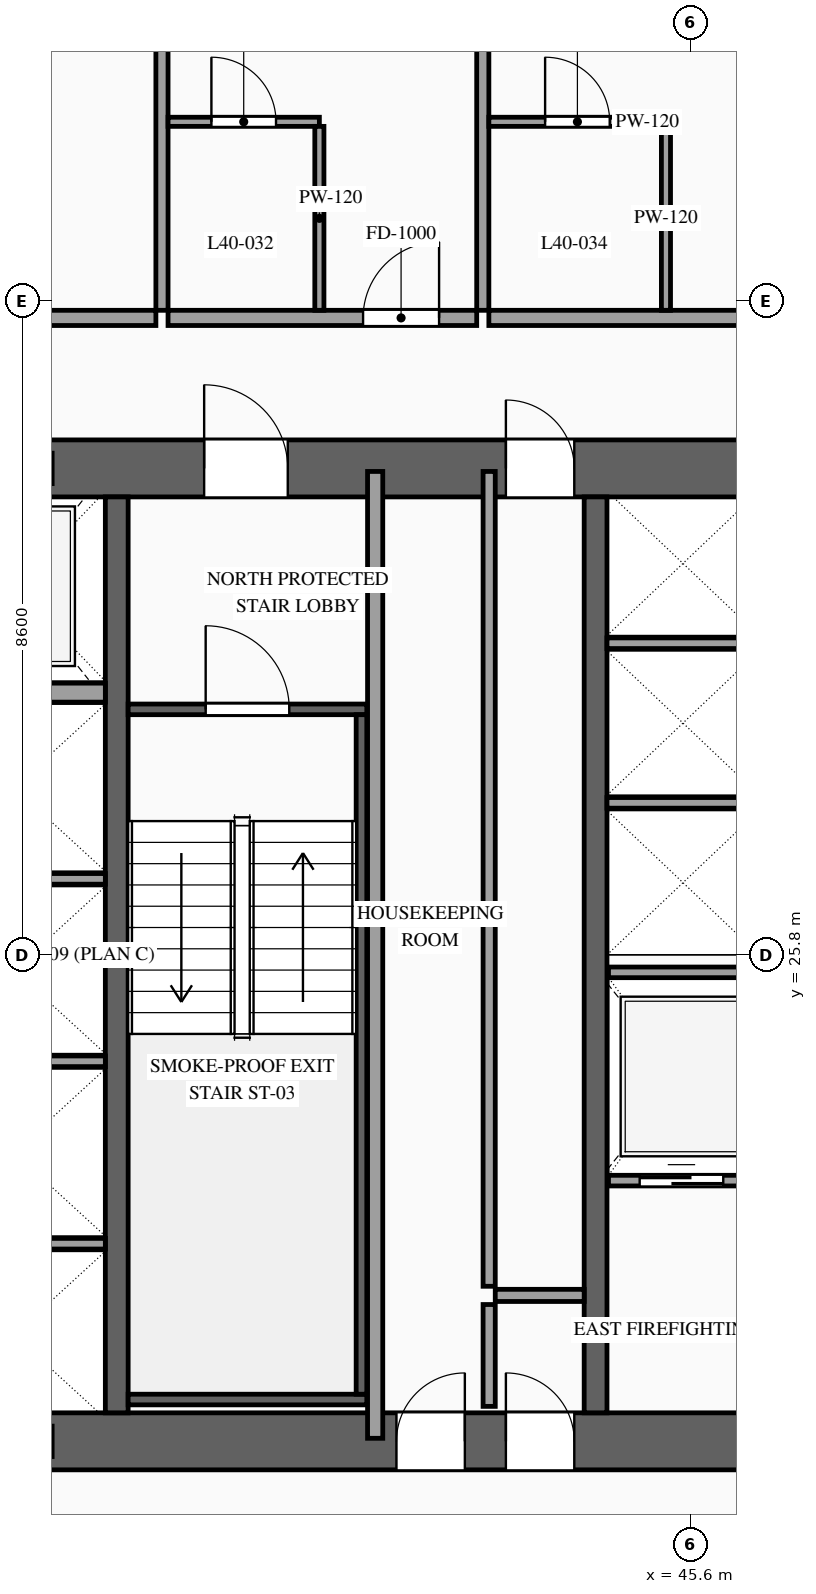
"""IFC4 building model, lengths in metres.
Left out: names, types, materials, properties, quantities, classifications, styles, units other than length and angle.
Written with IfcOpenShell. Run it as: python <this file> out.ifc"""

import sys

from ifc_helpers import new_model, si_unit, direction, frame, frame_2d, origin, place, context, subcontext, project, spatial, rectangle, extrude, source, transform, mapped, element, fill, save


model = new_model("IFC4")
c1 = context("Model", 3, precision=1e-05, world=origin(), true_north=direction((0.0, 1.0)))
c2 = subcontext(c1, "Body", "Model", "MODEL_VIEW")
j1 = project(units=[si_unit("LENGTHUNIT", "METRE"), si_unit("PLANEANGLEUNIT", "RADIAN")], contexts=[c1])
p1 = place(None, origin())
s1 = spatial("IfcSite", under=j1, at=p1, CompositionType="ELEMENT")
p2 = place(p1, origin())
s2 = spatial("IfcBuilding", under=s1, at=p2, CompositionType="ELEMENT")
p3 = place(p2, frame((0.0, 0.0, 152.4)))
s3 = spatial("IfcBuildingStorey", under=s2, at=p3, CompositionType="ELEMENT", Elevation=152.4)
p4 = place(p3, frame((23.425, 19.4, 0.0), z_axis=(0.0, 0.0, 1.0), x_axis=(1.0, 0.0, 0.0)))
e1 = element("IfcWall", 1, at=p4, inside=s3, PredefinedType="SHEAR", context=c2, shape_type="SweptSolid", body=[
    extrude(rectangle(XDim=27.15, YDim=0.75, at=frame_2d((13.575, 0.0))), origin(), (0.0, 0.0, 1.0), 3.6),
])
p5 = place(p4, frame((2.025, 0.0, 0.0)))
e2 = element("IfcOpeningElement", 2, at=p5, cuts=e1, PredefinedType="OPENING", context=c2, shape_type="SweptSolid", body=[
    extrude(rectangle(XDim=1.1, YDim=2.2, at=frame_2d((0.55, 1.1))), frame((0.0, 0.39, 0.0), z_axis=(0.0, -1.0, 0.0), x_axis=(1.0, 0.0, 0.0)), (0.0, 0.0, 1.0), 0.78),
])
p6 = place(p4, frame((9.925, 0.0, 0.0)))
e3 = element("IfcOpeningElement", 3, at=p6, cuts=e1, PredefinedType="OPENING", context=c2, shape_type="SweptSolid", body=[
    extrude(rectangle(XDim=1.1, YDim=2.2, at=frame_2d((0.55, 1.1))), frame((0.0, 0.39, 0.0), z_axis=(0.0, -1.0, 0.0), x_axis=(1.0, 0.0, 0.0)), (0.0, 0.0, 1.0), 0.78),
])
p7 = place(p4, frame((23.125, 0.0, 0.0)))
e4 = element("IfcOpeningElement", 4, at=p7, cuts=e1, PredefinedType="OPENING", context=c2, shape_type="SweptSolid", body=[
    extrude(rectangle(XDim=1.1, YDim=2.2, at=frame_2d((0.55, 1.1))), frame((0.0, 0.39, 0.0), z_axis=(0.0, -1.0, 0.0), x_axis=(1.0, 0.0, 0.0)), (0.0, 0.0, 1.0), 0.78),
])
p8 = place(p4, frame((19.745, 0.0, 0.0)))
e5 = element("IfcOpeningElement", 5, at=p8, cuts=e1, PredefinedType="OPENING", context=c2, shape_type="SweptSolid", body=[
    extrude(rectangle(XDim=0.9, YDim=2.15, at=frame_2d((0.45, 1.075))), frame((0.0, 0.39, 0.0), z_axis=(0.0, -1.0, 0.0), x_axis=(1.0, 0.0, 0.0)), (0.0, 0.0, 1.0), 0.78),
])
p9 = place(p4, frame((18.305, 0.0, 0.0)))
e6 = element("IfcOpeningElement", 6, at=p9, cuts=e1, PredefinedType="OPENING", context=c2, shape_type="SweptSolid", body=[
    extrude(rectangle(XDim=0.9, YDim=2.15, at=frame_2d((0.45, 1.075))), frame((0.0, 0.39, 0.0), z_axis=(0.0, -1.0, 0.0), x_axis=(1.0, 0.0, 0.0)), (0.0, 0.0, 1.0), 0.78),
])
p10 = place(p3, frame((23.425, 32.2, 0.0), z_axis=(0.0, 0.0, 1.0), x_axis=(1.0, 0.0, 0.0)))
e7 = element("IfcWall", 7, at=p10, inside=s3, PredefinedType="SHEAR", context=c2, shape_type="SweptSolid", body=[
    extrude(rectangle(XDim=27.15, YDim=0.75, at=frame_2d((13.575, 0.0))), origin(), (0.0, 0.0, 1.0), 3.6),
])
p11 = place(p10, frame((4.645, 0.0, 0.0)))
e8 = element("IfcOpeningElement", 8, at=p11, cuts=e7, PredefinedType="OPENING", context=c2, shape_type="SweptSolid", body=[
    extrude(rectangle(XDim=0.9, YDim=2.15, at=frame_2d((0.45, 1.075))), frame((0.0, 0.39, 0.0), z_axis=(0.0, -1.0, 0.0), x_axis=(1.0, 0.0, 0.0)), (0.0, 0.0, 1.0), 0.78),
])
p12 = place(p10, frame((9.925, 0.0, 0.0)))
e9 = element("IfcOpeningElement", 9, at=p12, cuts=e7, PredefinedType="OPENING", context=c2, shape_type="SweptSolid", body=[
    extrude(rectangle(XDim=1.1, YDim=2.2, at=frame_2d((0.55, 1.1))), frame((0.0, 0.39, 0.0), z_axis=(0.0, -1.0, 0.0), x_axis=(1.0, 0.0, 0.0)), (0.0, 0.0, 1.0), 0.78),
])
p13 = place(p10, frame((15.775, 0.0, 0.0)))
e10 = element("IfcOpeningElement", 10, at=p13, cuts=e7, PredefinedType="OPENING", context=c2, shape_type="SweptSolid", body=[
    extrude(rectangle(XDim=1.1, YDim=2.2, at=frame_2d((0.55, 1.1))), frame((0.0, 0.39, 0.0), z_axis=(0.0, -1.0, 0.0), x_axis=(1.0, 0.0, 0.0)), (0.0, 0.0, 1.0), 0.78),
])
p14 = place(p10, frame((19.745, 0.0, 0.0)))
e11 = element("IfcOpeningElement", 11, at=p14, cuts=e7, PredefinedType="OPENING", context=c2, shape_type="SweptSolid", body=[
    extrude(rectangle(XDim=0.9, YDim=2.15, at=frame_2d((0.45, 1.075))), frame((0.0, 0.39, 0.0), z_axis=(0.0, -1.0, 0.0), x_axis=(1.0, 0.0, 0.0)), (0.0, 0.0, 1.0), 0.78),
])
m1 = source(origin(), c2, "Body", "SweptSolid", [
    extrude(rectangle(XDim=12.05, YDim=0.3, at=frame_2d((6.025, 0.0))), origin(), (0.0, 0.0, 1.0), 3.6),
])
for number, where, z_axis, x_axis in (
    (12, (38.05, 19.775, 0.0), (0.0, 0.0, 1.0), (0.0, 1.0, 0.0)),
    (13, (44.35, 19.775, 0.0), (0.0, 0.0, 1.0), (0.0, 1.0, 0.0)),
):
    element("IfcWall", number, at=place(p3, frame(where, z_axis=z_axis, x_axis=x_axis)), inside=s3, PredefinedType="SOLIDWALL", context=c2, shape_type="MappedRepresentation", body=[
        mapped(m1, transform((0.0, 0.0, 0.0), scale=1.0)),
    ])
p15 = place(p3, frame((44.52, 22.83, 0.0), z_axis=(0.0, 0.0, 1.0), x_axis=(1.0, 0.0, 0.0)))
e14 = element("IfcWall", 14, at=p15, inside=s3, PredefinedType="SOLIDWALL", context=c2, shape_type="SweptSolid", body=[
    extrude(rectangle(XDim=1.92, YDim=0.14, at=frame_2d((0.96, 0.0))), origin(), (0.0, 0.0, 1.0), 3.38),
])
p16 = place(p15, frame((0.41, 0.0, 0.0)))
e15 = element("IfcOpeningElement", 15, at=p16, cuts=e14, PredefinedType="OPENING", context=c2, shape_type="SweptSolid", body=[
    extrude(rectangle(XDim=1.1, YDim=2.2, at=frame_2d((0.55, 1.1))), frame((0.0, 0.085, 0.0), z_axis=(0.0, -1.0, 0.0), x_axis=(1.0, 0.0, 0.0)), (0.0, 0.0, 1.0), 0.17),
])
m2 = source(origin(), c2, "Body", "SweptSolid", [
    extrude(rectangle(XDim=1.92, YDim=0.14, at=frame_2d((0.96, 0.0))), origin(), (0.0, 0.0, 1.0), 3.38),
])
p17 = place(p3, frame((44.52, 25.57, 0.0), z_axis=(0.0, 0.0, 1.0), x_axis=(1.0, 0.0, 0.0)))
e16 = element("IfcWall", 16, at=p17, inside=s3, PredefinedType="SOLIDWALL", context=c2, shape_type="MappedRepresentation", body=[
    mapped(m2, transform((0.0, 0.0, 0.0), scale=1.0)),
])
m3 = source(origin(), c2, "Body", "SweptSolid", [
    extrude(rectangle(XDim=2.4, YDim=0.14, at=frame_2d((1.2, 0.0))), origin(), (0.0, 0.0, 1.0), 3.38),
])
for number, where, z_axis, x_axis in (
    (17, (35.5, 22.0, 0.0), (0.0, 0.0, 1.0), (1.0, 0.0, 0.0)),
    (18, (35.5, 24.4, 0.0), (0.0, 0.0, 1.0), (1.0, 0.0, 0.0)),
    (19, (35.5, 26.8, 0.0), (0.0, 0.0, 1.0), (1.0, 0.0, 0.0)),
):
    element("IfcWall", number, at=place(p3, frame(where, z_axis=z_axis, x_axis=x_axis)), inside=s3, PredefinedType="SOLIDWALL", context=c2, shape_type="MappedRepresentation", body=[
        mapped(m3, transform((0.0, 0.0, 0.0), scale=1.0)),
    ])
m4 = source(origin(), c2, "Body", "SweptSolid", [
    extrude(rectangle(XDim=2.4, YDim=0.25, at=frame_2d((1.2, 0.0))), origin(), (0.0, 0.0, 1.0), 3.38),
])
p18 = place(p3, frame((35.5, 29.25, 0.0), z_axis=(0.0, 0.0, 1.0), x_axis=(1.0, 0.0, 0.0)))
e20 = element("IfcWall", 20, at=p18, inside=s3, PredefinedType="SOLIDWALL", context=c2, shape_type="MappedRepresentation", body=[
    mapped(m4, transform((0.0, 0.0, 0.0), scale=1.0)),
])
m5 = source(origin(), c2, "Body", "SweptSolid", [
    extrude(rectangle(XDim=2.0, YDim=0.14, at=frame_2d((1.0, 0.0))), origin(), (0.0, 0.0, 1.0), 3.38),
])
for number, where, z_axis, x_axis in (
    (21, (44.5, 27.8, 0.0), (0.0, 0.0, 1.0), (1.0, 0.0, 0.0)),
    (22, (44.5, 29.9, 0.0), (0.0, 0.0, 1.0), (1.0, 0.0, 0.0)),
):
    element("IfcWall", number, at=place(p3, frame(where, z_axis=z_axis, x_axis=x_axis)), inside=s3, PredefinedType="SOLIDWALL", context=c2, shape_type="MappedRepresentation", body=[
        mapped(m5, transform((0.0, 0.0, 0.0), scale=1.0)),
    ])
p19 = place(p3, frame((38.2, 29.03, 0.0), z_axis=(0.0, 0.0, 1.0), x_axis=(1.0, 0.0, 0.0)))
e23 = element("IfcWall", 23, at=p19, inside=s3, PredefinedType="SOLIDWALL", context=c2, shape_type="SweptSolid", body=[
    extrude(rectangle(XDim=3.14, YDim=0.14, at=frame_2d((1.57, 0.0))), origin(), (0.0, 0.0, 1.0), 3.38),
])
p20 = place(p19, frame((1.02, 0.0, 0.0)))
e24 = element("IfcOpeningElement", 24, at=p20, cuts=e23, PredefinedType="OPENING", context=c2, shape_type="SweptSolid", body=[
    extrude(rectangle(XDim=1.1, YDim=2.2, at=frame_2d((0.55, 1.1))), frame((0.0, 0.085, 0.0), z_axis=(0.0, -1.0, 0.0), x_axis=(1.0, 0.0, 0.0)), (0.0, 0.0, 1.0), 0.17),
])
m6 = source(origin(), c2, "Body", "SweptSolid", [
    extrude(rectangle(XDim=3.14, YDim=0.14, at=frame_2d((1.57, 0.0))), origin(), (0.0, 0.0, 1.0), 3.38),
])
p21 = place(p3, frame((38.2, 19.95, 0.0), z_axis=(0.0, 0.0, 1.0), x_axis=(1.0, 0.0, 0.0)))
e25 = element("IfcWall", 25, at=p21, inside=s3, PredefinedType="SOLIDWALL", context=c2, shape_type="MappedRepresentation", body=[
    mapped(m6, transform((0.0, 0.0, 0.0), scale=1.0)),
])
m7 = source(origin(), c2, "Body", "SweptSolid", [
    extrude(rectangle(XDim=8.94, YDim=0.14, at=frame_2d((4.47, 0.0))), origin(), (0.0, 0.0, 1.0), 3.38),
])
p22 = place(p3, frame((41.27, 20.02, 0.0), z_axis=(0.0, 0.0, 1.0), x_axis=(0.0, 1.0, 0.0)))
e26 = element("IfcWall", 26, at=p22, inside=s3, PredefinedType="SOLIDWALL", context=c2, shape_type="MappedRepresentation", body=[
    mapped(m7, transform((0.0, 0.0, 0.0), scale=1.0)),
])
m8 = source(origin(), c2, "Body", "SweptSolid", [
    extrude(rectangle(XDim=1.34, YDim=0.16, at=frame_2d((0.67, 0.0))), origin(), (0.0, 0.0, 1.0), 3.38),
])
p23 = place(p3, frame((42.95, 19.86, 0.0), z_axis=(0.0, 0.0, 1.0), x_axis=(0.0, 1.0, 0.0)))
e27 = element("IfcWall", 27, at=p23, inside=s3, PredefinedType="PARTITIONING", context=c2, shape_type="MappedRepresentation", body=[
    mapped(m8, transform((0.0, 0.0, 0.0), scale=1.0)),
])
m9 = source(origin(), c2, "Body", "SweptSolid", [
    extrude(rectangle(XDim=1.17, YDim=0.16, at=frame_2d((0.585, 0.0))), origin(), (0.0, 0.0, 1.0), 3.38),
])
p24 = place(p3, frame((43.03, 21.32, 0.0), z_axis=(0.0, 0.0, 1.0), x_axis=(1.0, 0.0, 0.0)))
e28 = element("IfcWall", 28, at=p24, inside=s3, PredefinedType="PARTITIONING", context=c2, shape_type="MappedRepresentation", body=[
    mapped(m9, transform((0.0, 0.0, 0.0), scale=1.0)),
])
m10 = source(origin(), c2, "Body", "SweptSolid", [
    extrude(rectangle(XDim=12.72, YDim=0.2, at=frame_2d((6.36, 0.0))), origin(), (0.0, 0.0, 1.0), 3.38),
])
p25 = place(p3, frame((41.45, 19.44, 0.0), z_axis=(0.0, 0.0, 1.0), x_axis=(0.0, 1.0, 0.0)))
e29 = element("IfcWall", 29, at=p25, inside=s3, PredefinedType="PARTITIONING", context=c2, shape_type="MappedRepresentation", body=[
    mapped(m10, transform((0.0, 0.0, 0.0), scale=1.0)),
])
m11 = source(origin(), c2, "Body", "SweptSolid", [
    extrude(rectangle(XDim=10.72, YDim=0.16, at=frame_2d((5.36, 0.0))), origin(), (0.0, 0.0, 1.0), 3.38),
])
p26 = place(p3, frame((42.95, 21.44, 0.0), z_axis=(0.0, 0.0, 1.0), x_axis=(0.0, 1.0, 0.0)))
e30 = element("IfcWall", 30, at=p26, inside=s3, PredefinedType="PARTITIONING", context=c2, shape_type="MappedRepresentation", body=[
    mapped(m11, transform((0.0, 0.0, 0.0), scale=1.0)),
])
p27 = place(p3, frame((29.24, 34.18, 0.0), z_axis=(0.0, 0.0, 1.0), x_axis=(1.0, 0.0, 0.0)))
e31 = element("IfcWall", 31, at=p27, inside=s3, PredefinedType="PARTITIONING", context=c2, shape_type="SweptSolid", body=[
    extrude(rectangle(XDim=9.325, YDim=0.2, at=frame_2d((4.663, 0.0))), origin(), (0.0, 0.0, 1.0), 3.38),
])
p28 = place(p27, frame((5.368, 0.0, 0.0)))
e32 = element("IfcOpeningElement", 32, at=p28, cuts=e31, PredefinedType="OPENING", context=c2, shape_type="SweptSolid", body=[
    extrude(rectangle(XDim=1.0, YDim=2.2, at=frame_2d((0.5, 1.1))), frame((0.0, 0.115, 0.0), z_axis=(0.0, -1.0, 0.0), x_axis=(1.0, 0.0, 0.0)), (0.0, 0.0, 1.0), 0.23),
])
m12 = source(origin(), c2, "Body", "SweptSolid", [
    extrude(rectangle(XDim=14.97, YDim=0.16, at=frame_2d((7.485, 0.0))), origin(), (0.0, 0.0, 1.0), 3.38),
])
p29 = place(p3, frame((38.645, 34.28, 0.0), z_axis=(0.0, 0.0, 1.0), x_axis=(0.0, 1.0, 0.0)))
e33 = element("IfcWall", 33, at=p29, inside=s3, PredefinedType="PARTITIONING", context=c2, shape_type="MappedRepresentation", body=[
    mapped(m12, transform((0.0, 0.0, 0.0), scale=1.0)),
])
p30 = place(p3, frame((38.725, 34.18, 0.0), z_axis=(0.0, 0.0, 1.0), x_axis=(1.0, 0.0, 0.0)))
e34 = element("IfcWall", 34, at=p30, inside=s3, PredefinedType="PARTITIONING", context=c2, shape_type="SweptSolid", body=[
    extrude(rectangle(XDim=4.061, YDim=0.2, at=frame_2d((2.03, 0.0))), origin(), (0.0, 0.0, 1.0), 3.38),
])
p31 = place(p30, frame((2.566, 0.0, 0.0)))
e35 = element("IfcOpeningElement", 35, at=p31, cuts=e34, PredefinedType="OPENING", context=c2, shape_type="SweptSolid", body=[
    extrude(rectangle(XDim=1.0, YDim=2.2, at=frame_2d((0.5, 1.1))), frame((0.0, 0.115, 0.0), z_axis=(0.0, -1.0, 0.0), x_axis=(1.0, 0.0, 0.0)), (0.0, 0.0, 1.0), 0.23),
])
p32 = place(p3, frame((42.866, 34.28, 0.0), z_axis=(0.0, 0.0, 1.0), x_axis=(0.0, 1.0, 0.0)))
e36 = element("IfcWall", 36, at=p32, inside=s3, PredefinedType="PARTITIONING", context=c2, shape_type="MappedRepresentation", body=[
    mapped(m12, transform((0.0, 0.0, 0.0), scale=1.0)),
])
p33 = place(p3, frame((38.725, 36.76, 0.0), z_axis=(0.0, 0.0, 1.0), x_axis=(1.0, 0.0, 0.0)))
e37 = element("IfcWall", 37, at=p33, inside=s3, PredefinedType="PARTITIONING", context=c2, shape_type="SweptSolid", body=[
    extrude(rectangle(XDim=1.991, YDim=0.12, at=frame_2d((0.996, 0.0))), origin(), (0.0, 0.0, 1.0), 3.38),
])
p34 = place(p33, frame((0.571, 0.0, 0.0)))
e38 = element("IfcOpeningElement", 38, at=p34, cuts=e37, PredefinedType="OPENING", context=c2, shape_type="SweptSolid", body=[
    extrude(rectangle(XDim=0.85, YDim=2.1, at=frame_2d((0.425, 1.05))), frame((0.0, 0.075, 0.0), z_axis=(0.0, -1.0, 0.0), x_axis=(1.0, 0.0, 0.0)), (0.0, 0.0, 1.0), 0.15),
])
m13 = source(origin(), c2, "Body", "SweptSolid", [
    extrude(rectangle(XDim=2.42, YDim=0.12, at=frame_2d((1.21, 0.0))), origin(), (0.0, 0.0, 1.0), 3.38),
])
p35 = place(p3, frame((40.716, 34.28, 0.0), z_axis=(0.0, 0.0, 1.0), x_axis=(0.0, 1.0, 0.0)))
e39 = element("IfcWall", 39, at=p35, inside=s3, PredefinedType="PARTITIONING", context=c2, shape_type="MappedRepresentation", body=[
    mapped(m13, transform((0.0, 0.0, 0.0), scale=1.0)),
])
p36 = place(p3, frame((42.946, 34.18, 0.0), z_axis=(0.0, 0.0, 1.0), x_axis=(1.0, 0.0, 0.0)))
e40 = element("IfcWall", 40, at=p36, inside=s3, PredefinedType="PARTITIONING", context=c2, shape_type="SweptSolid", body=[
    extrude(rectangle(XDim=8.777, YDim=0.2, at=frame_2d((4.388, 0.0))), origin(), (0.0, 0.0, 1.0), 3.38),
])
p37 = place(p36, frame((5.093, 0.0, 0.0)))
e41 = element("IfcOpeningElement", 41, at=p37, cuts=e40, PredefinedType="OPENING", context=c2, shape_type="SweptSolid", body=[
    extrude(rectangle(XDim=1.0, YDim=2.2, at=frame_2d((0.5, 1.1))), frame((0.0, 0.115, 0.0), z_axis=(0.0, -1.0, 0.0), x_axis=(1.0, 0.0, 0.0)), (0.0, 0.0, 1.0), 0.23),
])
p38 = place(p3, frame((42.946, 36.76, 0.0), z_axis=(0.0, 0.0, 1.0), x_axis=(1.0, 0.0, 0.0)))
e42 = element("IfcWall", 42, at=p38, inside=s3, PredefinedType="PARTITIONING", context=c2, shape_type="SweptSolid", body=[
    extrude(rectangle(XDim=2.33, YDim=0.12, at=frame_2d((1.165, 0.0))), origin(), (0.0, 0.0, 1.0), 3.38),
])
p39 = place(p38, frame((0.74, 0.0, 0.0)))
e43 = element("IfcOpeningElement", 43, at=p39, cuts=e42, PredefinedType="OPENING", context=c2, shape_type="SweptSolid", body=[
    extrude(rectangle(XDim=0.85, YDim=2.1, at=frame_2d((0.425, 1.05))), frame((0.0, 0.075, 0.0), z_axis=(0.0, -1.0, 0.0), x_axis=(1.0, 0.0, 0.0)), (0.0, 0.0, 1.0), 0.15),
])
p40 = place(p3, frame((45.276, 34.28, 0.0), z_axis=(0.0, 0.0, 1.0), x_axis=(0.0, 1.0, 0.0)))
e44 = element("IfcWall", 44, at=p40, inside=s3, PredefinedType="PARTITIONING", context=c2, shape_type="MappedRepresentation", body=[
    mapped(m13, transform((0.0, 0.0, 0.0), scale=1.0)),
])
m14 = source(origin(), c2, "Body", "SweptSolid", [
    extrude(rectangle(XDim=1.1, YDim=2.2, at=frame_2d((0.55, 1.1))), frame((0.0, 0.025, 0.0), z_axis=(0.0, -1.0, 0.0), x_axis=(1.0, 0.0, 0.0)), (0.0, 0.0, 1.0), 0.05),
])
p41 = place(p16, origin())
e45 = element("IfcDoor", 45, at=p41, inside=s3, OperationType="SLIDING_TO_RIGHT", PredefinedType="DOOR", context=c2, shape_type="MappedRepresentation", body=[
    mapped(m14, transform((0.0, 0.0, 0.0), scale=1.0)),
])
fill(e15, e45)
m15 = source(origin(), c2, "Body", "SweptSolid", [
    extrude(rectangle(XDim=1.1, YDim=2.2, at=frame_2d((0.55, 1.1))), frame((0.0, 0.025, 0.0), z_axis=(0.0, -1.0, 0.0), x_axis=(1.0, 0.0, 0.0)), (0.0, 0.0, 1.0), 0.05),
])
p42 = place(p20, origin())
e46 = element("IfcDoor", 46, at=p42, inside=s3, OperationType="SINGLE_SWING_LEFT", PredefinedType="DOOR", context=c2, shape_type="MappedRepresentation", body=[
    mapped(m15, transform((0.0, 0.0, 0.0), scale=1.0)),
])
fill(e24, e46)
p43 = place(p13, origin())
e47 = element("IfcDoor", 47, at=p43, inside=s3, OperationType="SINGLE_SWING_LEFT", PredefinedType="DOOR", context=c2, shape_type="MappedRepresentation", body=[
    mapped(m15, transform((0.0, 0.0, 0.0), scale=1.0)),
])
fill(e10, e47)
m16 = source(origin(), c2, "Body", "SweptSolid", [
    extrude(rectangle(XDim=0.9, YDim=2.15, at=frame_2d((0.45, 1.075))), frame((0.0, 0.025, 0.0), z_axis=(0.0, -1.0, 0.0), x_axis=(1.0, 0.0, 0.0)), (0.0, 0.0, 1.0), 0.05),
])
p44 = place(p8, origin())
e48 = element("IfcDoor", 48, at=p44, inside=s3, OperationType="SINGLE_SWING_LEFT", PredefinedType="DOOR", context=c2, shape_type="MappedRepresentation", body=[
    mapped(m16, transform((0.0, 0.0, 0.0), scale=1.0)),
])
fill(e5, e48)
p45 = place(p9, origin())
e49 = element("IfcDoor", 49, at=p45, inside=s3, OperationType="SINGLE_SWING_RIGHT", PredefinedType="DOOR", context=c2, shape_type="MappedRepresentation", body=[
    mapped(m16, transform((0.0, 0.0, 0.0), scale=1.0)),
])
fill(e6, e49)
p46 = place(p14, origin())
e50 = element("IfcDoor", 50, at=p46, inside=s3, OperationType="SINGLE_SWING_LEFT", PredefinedType="DOOR", context=c2, shape_type="MappedRepresentation", body=[
    mapped(m16, transform((0.0, 0.0, 0.0), scale=1.0)),
])
fill(e11, e50)
m17 = source(origin(), c2, "Body", "SweptSolid", [
    extrude(rectangle(XDim=1.0, YDim=2.2, at=frame_2d((0.5, 1.1))), frame((0.0, 0.025, 0.0), z_axis=(0.0, -1.0, 0.0), x_axis=(1.0, 0.0, 0.0)), (0.0, 0.0, 1.0), 0.05),
])
p47 = place(p31, origin())
e51 = element("IfcDoor", 51, at=p47, inside=s3, OperationType="SINGLE_SWING_RIGHT", PredefinedType="DOOR", context=c2, shape_type="MappedRepresentation", body=[
    mapped(m17, transform((0.0, 0.0, 0.0), scale=1.0)),
])
fill(e35, e51)
m18 = source(origin(), c2, "Body", "SweptSolid", [
    extrude(rectangle(XDim=0.85, YDim=2.1, at=frame_2d((0.425, 1.05))), frame((0.0, 0.025, 0.0), z_axis=(0.0, -1.0, 0.0), x_axis=(1.0, 0.0, 0.0)), (0.0, 0.0, 1.0), 0.05),
])
p48 = place(p34, origin())
e52 = element("IfcDoor", 52, at=p48, inside=s3, OperationType="SINGLE_SWING_LEFT", PredefinedType="DOOR", context=c2, shape_type="MappedRepresentation", body=[
    mapped(m18, transform((0.0, 0.0, 0.0), scale=1.0)),
])
fill(e38, e52)
p49 = place(p39, origin())
e53 = element("IfcDoor", 53, at=p49, inside=s3, OperationType="SINGLE_SWING_LEFT", PredefinedType="DOOR", context=c2, shape_type="MappedRepresentation", body=[
    mapped(m18, transform((0.0, 0.0, 0.0), scale=1.0)),
])
fill(e43, e53)
save(model, sys.argv[1])
